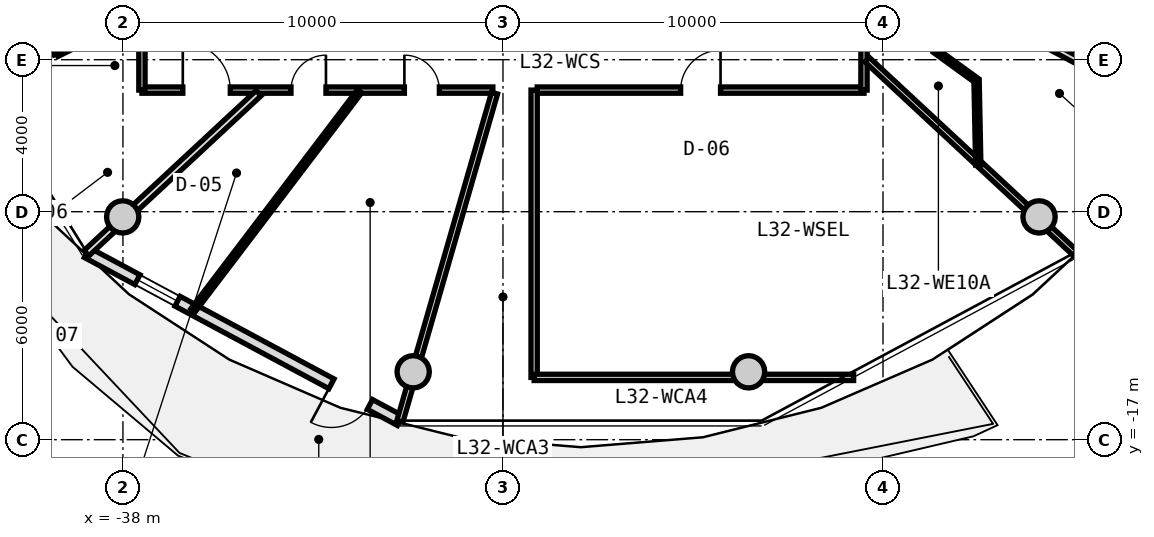
"""IFC4 building model, lengths in metres.
Left out: names, types, materials, properties, quantities, classifications, styles, units other than length and angle.
Written with IfcOpenShell. Run it as: python <this file> out.ifc"""

import sys

from ifc_helpers import new_model, si_unit, direction, frame, frame_2d, origin, origin_2d, place, context, subcontext, project, spatial, rectangle, circle, extrude, source, transform, mapped, element, fill, save


model = new_model("IFC4")
c1 = context("Model", 3, precision=1e-05, world=origin(), true_north=direction((0.0, 1.0)))
c2 = subcontext(c1, "Body", "Model", "MODEL_VIEW")
j1 = project(units=[si_unit("LENGTHUNIT", "METRE"), si_unit("PLANEANGLEUNIT", "RADIAN")], contexts=[c1])
p1 = place(None, origin())
s1 = spatial("IfcSite", under=j1, at=p1, CompositionType="ELEMENT")
p2 = place(p1, origin())
s2 = spatial("IfcBuilding", under=s1, at=p2, CompositionType="ELEMENT")
p3 = place(p2, frame((0.0, 0.0, 105.4)))
s3 = spatial("IfcBuildingStorey", under=s2, at=p3, CompositionType="ELEMENT", Elevation=105.4)
m1 = source(origin(), c2, "Body", "SweptSolid", [
    extrude(circle(Radius=0.425, at=origin_2d()), origin(), (0.0, 0.0, 1.0), 3.05),
])
for number, where, z_axis, x_axis in (
    (1, (-38.006, -11.137, 0.0), (0.0, 0.0, 1.0), (1.0, 0.0, 0.0)),
    (2, (-30.363, -15.213, 0.0), (0.0, 0.0, 1.0), (1.0, 0.0, 0.0)),
    (3, (-21.537, -15.213, 0.0), (0.0, 0.0, 1.0), (1.0, 0.0, 0.0)),
    (4, (-13.894, -11.137, 0.0), (0.0, 0.0, 1.0), (1.0, 0.0, 0.0)),
):
    element("IfcColumn", number, at=place(p3, frame(where, z_axis=z_axis, x_axis=x_axis)), inside=s3, PredefinedType="COLUMN", context=c2, shape_type="MappedRepresentation", body=[
        mapped(m1, transform((0.0, 0.0, 0.0), x_axis=(1.0, 0.0, 0.0), y_axis=(0.0, 1.0, 0.0), z_axis=(0.0, 0.0, 1.0), scale=1.0)),
    ])
m2 = source(origin(), c2, "Body", "SweptSolid", [
    extrude(rectangle(XDim=9.351, YDim=0.29, at=frame_2d((4.675, 0.0))), origin(), (0.0, 0.0, 1.0), 2.79),
])
p4 = place(p3, frame((-30.707, -16.498, 0.0), z_axis=(0.0, 0.0, 1.0), x_axis=(-0.881184411073, 0.472772708267, 0.0)))
e5 = element("IfcWall", 5, at=p4, inside=s3, PredefinedType="SOLIDWALL", context=c2, shape_type="MappedRepresentation", body=[
    mapped(m2, transform((0.0, 0.0, 0.0), x_axis=(1.0, 0.0, 0.0), y_axis=(0.0, 1.0, 0.0), z_axis=(0.0, 0.0, 1.0), scale=1.0)),
])
p5 = place(p4, frame((0.9, 0.0, 0.0)))
e6 = element("IfcOpeningElement", 6, at=p5, cuts=e5, PredefinedType="OPENING", context=c2, shape_type="SweptSolid", body=[
    extrude(rectangle(XDim=1.15, YDim=2.25, at=frame_2d((0.575, 1.125))), frame((0.0, 0.155, 0.0), z_axis=(0.0, -1.0, 0.0), x_axis=(1.0, 0.0, 0.0)), (0.0, 0.0, 1.0), 0.31),
])
p6 = place(p4, frame((6.645, 0.0, 0.85)))
e7 = element("IfcOpeningElement", 7, at=p6, cuts=e5, PredefinedType="OPENING", context=c2, shape_type="SweptSolid", body=[
    extrude(rectangle(XDim=1.2, YDim=1.5, at=frame_2d((0.6, 0.75))), frame((0.0, 0.155, 0.0), z_axis=(0.0, -1.0, 0.0), x_axis=(1.0, 0.0, 0.0)), (0.0, 0.0, 1.0), 0.31),
])
m3 = source(origin(), c2, "Body", "SweptSolid", [
    extrude(rectangle(XDim=8.6, YDim=0.165, at=frame_2d((4.3, 0.0))), origin(), (0.0, 0.0, 1.0), 2.775),
])
p7 = place(p3, frame((-18.5, -7.8, 0.0), z_axis=(0.0, 0.0, 1.0), x_axis=(-1.0, 0.0, 0.0)))
e8 = element("IfcWall", 8, at=p7, inside=s3, PredefinedType="PARTITIONING", context=c2, shape_type="MappedRepresentation", body=[
    mapped(m3, transform((0.0, 0.0, 0.0), x_axis=(1.0, 0.0, 0.0), y_axis=(0.0, 1.0, 0.0), z_axis=(0.0, 0.0, 1.0), scale=1.0)),
])
p8 = place(p7, frame((3.775, 0.0, 0.0)))
e9 = element("IfcOpeningElement", 9, at=p8, cuts=e8, PredefinedType="OPENING", context=c2, shape_type="SweptSolid", body=[
    extrude(rectangle(XDim=1.05, YDim=2.15, at=frame_2d((0.525, 1.075))), frame((0.0, 0.093, 0.0), z_axis=(0.0, -1.0, 0.0), x_axis=(1.0, 0.0, 0.0)), (0.0, 0.0, 1.0), 0.185),
])
m4 = source(origin(), c2, "Body", "SweptSolid", [
    extrude(rectangle(XDim=9.234, YDim=0.165, at=frame_2d((4.617, 0.0))), origin(), (0.0, 0.0, 1.0), 2.775),
])
p9 = place(p3, frame((-28.266, -7.8, 0.0), z_axis=(0.0, 0.0, 1.0), x_axis=(-1.0, 0.0, 0.0)))
e10 = element("IfcWall", 10, at=p9, inside=s3, PredefinedType="PARTITIONING", context=c2, shape_type="MappedRepresentation", body=[
    mapped(m4, transform((0.0, 0.0, 0.0), x_axis=(1.0, 0.0, 0.0), y_axis=(0.0, 1.0, 0.0), z_axis=(0.0, 0.0, 1.0), scale=1.0)),
])
p10 = place(p9, frame((6.909, 0.0, 0.0)))
e11 = element("IfcOpeningElement", 11, at=p10, cuts=e10, PredefinedType="OPENING", context=c2, shape_type="SweptSolid", body=[
    extrude(rectangle(XDim=1.25, YDim=2.2, at=frame_2d((0.625, 1.1))), frame((0.0, 0.093, 0.0), z_axis=(0.0, -1.0, 0.0), x_axis=(1.0, 0.0, 0.0)), (0.0, 0.0, 1.0), 0.185),
])
p11 = place(p9, frame((4.392, 0.0, 0.0)))
e12 = element("IfcOpeningElement", 12, at=p11, cuts=e10, PredefinedType="OPENING", context=c2, shape_type="SweptSolid", body=[
    extrude(rectangle(XDim=0.92, YDim=2.1, at=frame_2d((0.46, 1.05))), frame((0.0, 0.093, 0.0), z_axis=(0.0, -1.0, 0.0), x_axis=(1.0, 0.0, 0.0)), (0.0, 0.0, 1.0), 0.185),
])
p12 = place(p9, frame((1.408, 0.0, 0.0)))
e13 = element("IfcOpeningElement", 13, at=p12, cuts=e10, PredefinedType="OPENING", context=c2, shape_type="SweptSolid", body=[
    extrude(rectangle(XDim=0.92, YDim=2.1, at=frame_2d((0.46, 1.05))), frame((0.0, 0.093, 0.0), z_axis=(0.0, -1.0, 0.0), x_axis=(1.0, 0.0, 0.0)), (0.0, 0.0, 1.0), 0.185),
])
m5 = source(origin(), c2, "Body", "SweptSolid", [
    extrude(rectangle(XDim=15.6, YDim=0.165, at=frame_2d((7.8, 0.0))), origin(), (0.0, 0.0, 1.0), 2.775),
])
p13 = place(p3, frame((-37.5, -7.8, 0.0), z_axis=(0.0, 0.0, 1.0), x_axis=(0.0, 1.0, 0.0)))
e14 = element("IfcWall", 14, at=p13, inside=s3, PredefinedType="PARTITIONING", context=c2, shape_type="MappedRepresentation", body=[
    mapped(m5, transform((0.0, 0.0, 0.0), x_axis=(1.0, 0.0, 0.0), y_axis=(0.0, 1.0, 0.0), z_axis=(0.0, 0.0, 1.0), scale=1.0)),
])
p14 = place(p13, frame((11.994, 0.0, 0.0)))
e15 = element("IfcOpeningElement", 15, at=p14, cuts=e14, PredefinedType="OPENING", context=c2, shape_type="SweptSolid", body=[
    extrude(rectangle(XDim=1.25, YDim=2.2, at=frame_2d((0.625, 1.1))), frame((0.0, 0.093, 0.0), z_axis=(0.0, -1.0, 0.0), x_axis=(1.0, 0.0, 0.0)), (0.0, 0.0, 1.0), 0.185),
])
p15 = place(p13, frame((7.984, 0.0, 0.0)))
e16 = element("IfcOpeningElement", 16, at=p15, cuts=e14, PredefinedType="OPENING", context=c2, shape_type="SweptSolid", body=[
    extrude(rectangle(XDim=1.05, YDim=2.15, at=frame_2d((0.525, 1.075))), frame((0.0, 0.093, 0.0), z_axis=(0.0, -1.0, 0.0), x_axis=(1.0, 0.0, 0.0)), (0.0, 0.0, 1.0), 0.185),
])
p16 = place(p13, frame((5.777, 0.0, 0.0)))
e17 = element("IfcOpeningElement", 17, at=p16, cuts=e14, PredefinedType="OPENING", context=c2, shape_type="SweptSolid", body=[
    extrude(rectangle(XDim=1.05, YDim=2.15, at=frame_2d((0.525, 1.075))), frame((0.0, 0.093, 0.0), z_axis=(0.0, -1.0, 0.0), x_axis=(1.0, 0.0, 0.0)), (0.0, 0.0, 1.0), 0.185),
])
p17 = place(p3, frame((-18.5, 7.8, 0.0), z_axis=(0.0, 0.0, 1.0), x_axis=(0.0, -1.0, 0.0)))
e18 = element("IfcWall", 18, at=p17, inside=s3, PredefinedType="PARTITIONING", context=c2, shape_type="MappedRepresentation", body=[
    mapped(m5, transform((0.0, 0.0, 0.0), x_axis=(1.0, 0.0, 0.0), y_axis=(0.0, 1.0, 0.0), z_axis=(0.0, 0.0, 1.0), scale=1.0)),
])
p18 = place(p17, frame((12.002, 0.0, 0.0)))
e19 = element("IfcOpeningElement", 19, at=p18, cuts=e18, PredefinedType="OPENING", context=c2, shape_type="SweptSolid", body=[
    extrude(rectangle(XDim=1.05, YDim=2.15, at=frame_2d((0.525, 1.075))), frame((0.0, 0.093, 0.0), z_axis=(0.0, -1.0, 0.0), x_axis=(1.0, 0.0, 0.0)), (0.0, 0.0, 1.0), 0.185),
])
p19 = place(p17, frame((10.211, 0.0, 0.0)))
e20 = element("IfcOpeningElement", 20, at=p19, cuts=e18, PredefinedType="OPENING", context=c2, shape_type="SweptSolid", body=[
    extrude(rectangle(XDim=1.05, YDim=2.15, at=frame_2d((0.525, 1.075))), frame((0.0, 0.093, 0.0), z_axis=(0.0, -1.0, 0.0), x_axis=(1.0, 0.0, 0.0)), (0.0, 0.0, 1.0), 0.185),
])
p20 = place(p17, frame((7.722, 0.0, 0.0)))
e21 = element("IfcOpeningElement", 21, at=p20, cuts=e18, PredefinedType="OPENING", context=c2, shape_type="SweptSolid", body=[
    extrude(rectangle(XDim=1.05, YDim=2.15, at=frame_2d((0.525, 1.075))), frame((0.0, 0.093, 0.0), z_axis=(0.0, -1.0, 0.0), x_axis=(1.0, 0.0, 0.0)), (0.0, 0.0, 1.0), 0.185),
])
p21 = place(p17, frame((6.291, 0.0, 0.0)))
e22 = element("IfcOpeningElement", 22, at=p21, cuts=e18, PredefinedType="OPENING", context=c2, shape_type="SweptSolid", body=[
    extrude(rectangle(XDim=1.05, YDim=2.15, at=frame_2d((0.525, 1.075))), frame((0.0, 0.093, 0.0), z_axis=(0.0, -1.0, 0.0), x_axis=(1.0, 0.0, 0.0)), (0.0, 0.0, 1.0), 0.185),
])
p22 = place(p17, frame((2.465, 0.0, 0.0)))
e23 = element("IfcOpeningElement", 23, at=p22, cuts=e18, PredefinedType="OPENING", context=c2, shape_type="SweptSolid", body=[
    extrude(rectangle(XDim=1.25, YDim=2.2, at=frame_2d((0.625, 1.1))), frame((0.0, 0.093, 0.0), z_axis=(0.0, -1.0, 0.0), x_axis=(1.0, 0.0, 0.0)), (0.0, 0.0, 1.0), 0.185),
])
m6 = source(origin(), c2, "Body", "SweptSolid", [
    extrude(rectangle(XDim=8.989, YDim=0.165, at=frame_2d((4.495, 0.0))), origin(), (0.0, 0.0, 1.0), 2.275),
])
p23 = place(p3, frame((-28.222, -7.88, 0.0), z_axis=(0.0, 0.0, 1.0), x_axis=(-0.27702323008, -0.960863221274, 0.0)))
e24 = element("IfcWall", 24, at=p23, inside=s3, PredefinedType="PARTITIONING", context=c2, shape_type="MappedRepresentation", body=[
    mapped(m6, transform((0.0, 0.0, 0.0), x_axis=(1.0, 0.0, 0.0), y_axis=(0.0, 1.0, 0.0), z_axis=(0.0, 0.0, 1.0), scale=1.0)),
])
m7 = source(origin(), c2, "Body", "SweptSolid", [
    extrude(rectangle(XDim=7.482, YDim=0.165, at=frame_2d((3.741, 0.0))), origin(), (0.0, 0.0, 1.0), 2.275),
])
p24 = place(p3, frame((-18.42, -6.998, 0.0), z_axis=(0.0, 0.0, 1.0), x_axis=(0.732508698043, -0.680757671489, 0.0)))
e25 = element("IfcWall", 25, at=p24, inside=s3, PredefinedType="PARTITIONING", context=c2, shape_type="MappedRepresentation", body=[
    mapped(m7, transform((0.0, 0.0, 0.0), x_axis=(1.0, 0.0, 0.0), y_axis=(0.0, 1.0, 0.0), z_axis=(0.0, 0.0, 1.0), scale=1.0)),
])
m8 = source(origin(), c2, "Body", "SweptSolid", [
    extrude(rectangle(XDim=7.56, YDim=0.165, at=frame_2d((3.78, 0.0))), origin(), (0.0, 0.0, 1.0), 2.775),
])
p25 = place(p3, frame((-27.18, -15.36, 0.0), z_axis=(0.0, 0.0, 1.0), x_axis=(0.0, 1.0, 0.0)))
e26 = element("IfcWall", 26, at=p25, inside=s3, PredefinedType="PARTITIONING", context=c2, shape_type="MappedRepresentation", body=[
    mapped(m8, transform((0.0, 0.0, 0.0), x_axis=(1.0, 0.0, 0.0), y_axis=(0.0, 1.0, 0.0), z_axis=(0.0, 0.0, 1.0), scale=1.0)),
])
m9 = source(origin(), c2, "Body", "SweptSolid", [
    extrude(rectangle(XDim=8.407, YDim=0.165, at=frame_2d((4.204, 0.0))), origin(), (0.0, 0.0, 1.0), 2.275),
])
p26 = place(p3, frame((-27.18, -15.36, 0.0), z_axis=(0.0, 0.0, 1.0), x_axis=(1.0, 0.0, 0.0)))
e27 = element("IfcWall", 27, at=p26, inside=s3, PredefinedType="PARTITIONING", context=c2, shape_type="MappedRepresentation", body=[
    mapped(m9, transform((0.0, 0.0, 0.0), x_axis=(1.0, 0.0, 0.0), y_axis=(0.0, 1.0, 0.0), z_axis=(0.0, 0.0, 1.0), scale=1.0)),
])
m10 = source(origin(), c2, "Body", "SweptSolid", [
    extrude(rectangle(XDim=6.187, YDim=0.19, at=frame_2d((3.093, 0.0))), origin(), (0.0, 0.0, 1.0), 2.415),
])
p27 = place(p3, frame((-34.429, -7.88, 0.0), z_axis=(0.0, 0.0, 1.0), x_axis=(-0.732501077882, -0.680765870841, 0.0)))
e28 = element("IfcWall", 28, at=p27, inside=s3, PredefinedType="PARTITIONING", context=c2, shape_type="MappedRepresentation", body=[
    mapped(m10, transform((0.0, 0.0, 0.0), x_axis=(1.0, 0.0, 0.0), y_axis=(0.0, 1.0, 0.0), z_axis=(0.0, 0.0, 1.0), scale=1.0)),
])
m11 = source(origin(), c2, "Body", "SweptSolid", [
    extrude(rectangle(XDim=2.469, YDim=0.14, at=frame_2d((1.235, 0.0))), origin(), (0.0, 0.0, 1.0), 2.775),
])
p28 = place(p3, frame((-37.53, -5.754, 0.0), z_axis=(0.0, 0.0, 1.0), x_axis=(-0.895512172456, -0.445037019789, 0.0)))
e29 = element("IfcWall", 29, at=p28, inside=s3, PredefinedType="PARTITIONING", context=c2, shape_type="MappedRepresentation", body=[
    mapped(m11, transform((0.0, 0.0, 0.0), x_axis=(1.0, 0.0, 0.0), y_axis=(0.0, 1.0, 0.0), z_axis=(0.0, 0.0, 1.0), scale=1.0)),
])
m12 = source(origin(), c2, "Body", "SweptSolid", [
    extrude(rectangle(XDim=3.314, YDim=0.14, at=frame_2d((1.657, 0.0))), origin(), (0.0, 0.0, 1.0), 2.775),
])
p29 = place(p3, frame((-39.741, -6.853, 0.0), z_axis=(0.0, 0.0, 1.0), x_axis=(-0.338067217654, 0.941121966776, 0.0)))
e30 = element("IfcWall", 30, at=p29, inside=s3, PredefinedType="PARTITIONING", context=c2, shape_type="MappedRepresentation", body=[
    mapped(m12, transform((0.0, 0.0, 0.0), x_axis=(1.0, 0.0, 0.0), y_axis=(0.0, 1.0, 0.0), z_axis=(0.0, 0.0, 1.0), scale=1.0)),
])
p30 = place(p29, frame((1.197, 0.0, 0.0)))
e31 = element("IfcOpeningElement", 31, at=p30, cuts=e30, PredefinedType="OPENING", context=c2, shape_type="SweptSolid", body=[
    extrude(rectangle(XDim=0.92, YDim=2.1, at=frame_2d((0.46, 1.05))), frame((0.0, 0.08, 0.0), z_axis=(0.0, -1.0, 0.0), x_axis=(1.0, 0.0, 0.0)), (0.0, 0.0, 1.0), 0.16),
])
m13 = source(origin(), c2, "Body", "SweptSolid", [
    extrude(rectangle(XDim=7.243, YDim=0.14, at=frame_2d((3.621, 0.0))), origin(), (0.0, 0.0, 1.0), 2.775),
])
p31 = place(p3, frame((-31.774, -7.83, 0.0), z_axis=(0.0, 0.0, 1.0), x_axis=(-0.605111472002, -0.796140757939, 0.0)))
e32 = element("IfcWall", 32, at=p31, inside=s3, PredefinedType="PARTITIONING", context=c2, shape_type="MappedRepresentation", body=[
    mapped(m13, transform((0.0, 0.0, 0.0), x_axis=(1.0, 0.0, 0.0), y_axis=(0.0, 1.0, 0.0), z_axis=(0.0, 0.0, 1.0), scale=1.0)),
])
m14 = source(origin(), c2, "Body", "SweptSolid", [
    extrude(rectangle(XDim=8.744, YDim=0.19, at=frame_2d((4.372, 0.0))), origin(), (0.0, 0.0, 1.0), 2.775),
])
p32 = place(p3, frame((-18.273, -4.142, 0.0), z_axis=(0.0, 0.0, 1.0), x_axis=(0.882252449936, -0.470776607938, 0.0)))
e33 = element("IfcWall", 33, at=p32, inside=s3, PredefinedType="PARTITIONING", context=c2, shape_type="MappedRepresentation", body=[
    mapped(m14, transform((0.0, 0.0, 0.0), x_axis=(1.0, 0.0, 0.0), y_axis=(0.0, 1.0, 0.0), z_axis=(0.0, 0.0, 1.0), scale=1.0)),
])
m15 = source(origin(), c2, "Body", "SweptSolid", [
    extrude(rectangle(XDim=3.621, YDim=0.14, at=frame_2d((1.811, 0.0))), origin(), (0.0, 0.0, 1.0), 2.775),
])
p33 = place(p3, frame((-18.47, -5.422, 0.0), z_axis=(0.0, 0.0, 1.0), x_axis=(0.80968252222, -0.586868139544, 0.0)))
e34 = element("IfcWall", 34, at=p33, inside=s3, PredefinedType="PARTITIONING", context=c2, shape_type="MappedRepresentation", body=[
    mapped(m15, transform((0.0, 0.0, 0.0), x_axis=(1.0, 0.0, 0.0), y_axis=(0.0, 1.0, 0.0), z_axis=(0.0, 0.0, 1.0), scale=1.0)),
])
p34 = place(p33, frame((1.351, 0.0, 0.0)))
e35 = element("IfcOpeningElement", 35, at=p34, cuts=e34, PredefinedType="OPENING", context=c2, shape_type="SweptSolid", body=[
    extrude(rectangle(XDim=0.92, YDim=2.1, at=frame_2d((0.46, 1.05))), frame((0.0, 0.08, 0.0), z_axis=(0.0, -1.0, 0.0), x_axis=(1.0, 0.0, 0.0)), (0.0, 0.0, 1.0), 0.16),
])
m16 = source(origin(), c2, "Body", "SweptSolid", [
    extrude(rectangle(XDim=2.225, YDim=0.14, at=frame_2d((1.112, 0.0))), origin(), (0.0, 0.0, 1.0), 2.775),
])
p35 = place(p3, frame((-15.538, -7.547, 0.0), z_axis=(0.0, 0.0, 1.0), x_axis=(0.019971869027, -0.999800542332, 0.0)))
e36 = element("IfcWall", 36, at=p35, inside=s3, PredefinedType="PARTITIONING", context=c2, shape_type="MappedRepresentation", body=[
    mapped(m16, transform((0.0, 0.0, 0.0), x_axis=(1.0, 0.0, 0.0), y_axis=(0.0, 1.0, 0.0), z_axis=(0.0, 0.0, 1.0), scale=1.0)),
])
m17 = source(origin(), c2, "Body", "SweptSolid", [
    extrude(rectangle(XDim=1.15, YDim=2.25, at=frame_2d((0.575, 1.125))), frame((0.0, 0.025, 0.0), z_axis=(0.0, -1.0, 0.0), x_axis=(1.0, 0.0, 0.0)), (0.0, 0.0, 1.0), 0.05),
])
p36 = place(p5, origin())
e37 = element("IfcDoor", 37, at=p36, inside=s3, OperationType="SINGLE_SWING_RIGHT", PredefinedType="DOOR", context=c2, shape_type="MappedRepresentation", body=[
    mapped(m17, transform((0.0, 0.0, 0.0), x_axis=(1.0, 0.0, 0.0), y_axis=(0.0, 1.0, 0.0), z_axis=(0.0, 0.0, 1.0), scale=1.0)),
])
fill(e6, e37)
m18 = source(origin(), c2, "Body", "SweptSolid", [
    extrude(rectangle(XDim=1.2, YDim=1.5, at=frame_2d((0.6, 0.75))), frame((0.0, 0.03, 0.0), z_axis=(0.0, -1.0, 0.0), x_axis=(1.0, 0.0, 0.0)), (0.0, 0.0, 1.0), 0.06),
])
p37 = place(p6, origin())
e38 = element("IfcWindow", 38, at=p37, inside=s3, PartitioningType="SINGLE_PANEL", PredefinedType="WINDOW", context=c2, shape_type="MappedRepresentation", body=[
    mapped(m18, transform((0.0, 0.0, 0.0), x_axis=(1.0, 0.0, 0.0), y_axis=(0.0, 1.0, 0.0), z_axis=(0.0, 0.0, 1.0), scale=1.0)),
])
fill(e7, e38)
m19 = source(origin(), c2, "Body", "SweptSolid", [
    extrude(rectangle(XDim=1.05, YDim=2.15, at=frame_2d((0.525, 1.075))), frame((0.0, 0.025, 0.0), z_axis=(0.0, -1.0, 0.0), x_axis=(1.0, 0.0, 0.0)), (0.0, 0.0, 1.0), 0.05),
])
p38 = place(p8, frame((1.05, 0.0, 0.0), z_axis=(0.0, 0.0, 1.0), x_axis=(-1.0, 0.0, 0.0)))
e39 = element("IfcDoor", 39, at=p38, inside=s3, OperationType="SINGLE_SWING_RIGHT", PredefinedType="DOOR", context=c2, shape_type="MappedRepresentation", body=[
    mapped(m19, transform((0.0, 0.0, 0.0), x_axis=(1.0, 0.0, 0.0), y_axis=(0.0, 1.0, 0.0), z_axis=(0.0, 0.0, 1.0), scale=1.0)),
])
fill(e9, e39)
m20 = source(origin(), c2, "Body", "SweptSolid", [
    extrude(rectangle(XDim=1.25, YDim=2.2, at=frame_2d((0.625, 1.1))), frame((0.0, 0.025, 0.0), z_axis=(0.0, -1.0, 0.0), x_axis=(1.0, 0.0, 0.0)), (0.0, 0.0, 1.0), 0.05),
])
p39 = place(p10, frame((1.25, 0.0, 0.0), z_axis=(0.0, 0.0, 1.0), x_axis=(-1.0, 0.0, 0.0)))
e40 = element("IfcDoor", 40, at=p39, inside=s3, OperationType="SINGLE_SWING_LEFT", PredefinedType="DOOR", context=c2, shape_type="MappedRepresentation", body=[
    mapped(m20, transform((0.0, 0.0, 0.0), x_axis=(1.0, 0.0, 0.0), y_axis=(0.0, 1.0, 0.0), z_axis=(0.0, 0.0, 1.0), scale=1.0)),
])
fill(e11, e40)
m21 = source(origin(), c2, "Body", "SweptSolid", [
    extrude(rectangle(XDim=0.92, YDim=2.1, at=frame_2d((0.46, 1.05))), frame((0.0, 0.025, 0.0), z_axis=(0.0, -1.0, 0.0), x_axis=(1.0, 0.0, 0.0)), (0.0, 0.0, 1.0), 0.05),
])
p40 = place(p11, frame((0.92, 0.0, 0.0), z_axis=(0.0, 0.0, 1.0), x_axis=(-1.0, 0.0, 0.0)))
e41 = element("IfcDoor", 41, at=p40, inside=s3, OperationType="SINGLE_SWING_RIGHT", PredefinedType="DOOR", context=c2, shape_type="MappedRepresentation", body=[
    mapped(m21, transform((0.0, 0.0, 0.0), x_axis=(1.0, 0.0, 0.0), y_axis=(0.0, 1.0, 0.0), z_axis=(0.0, 0.0, 1.0), scale=1.0)),
])
fill(e12, e41)
p41 = place(p12, frame((0.92, 0.0, 0.0), z_axis=(0.0, 0.0, 1.0), x_axis=(-1.0, 0.0, 0.0)))
e42 = element("IfcDoor", 42, at=p41, inside=s3, OperationType="SINGLE_SWING_LEFT", PredefinedType="DOOR", context=c2, shape_type="MappedRepresentation", body=[
    mapped(m21, transform((0.0, 0.0, 0.0), x_axis=(1.0, 0.0, 0.0), y_axis=(0.0, 1.0, 0.0), z_axis=(0.0, 0.0, 1.0), scale=1.0)),
])
fill(e13, e42)
save(model, sys.argv[1])
